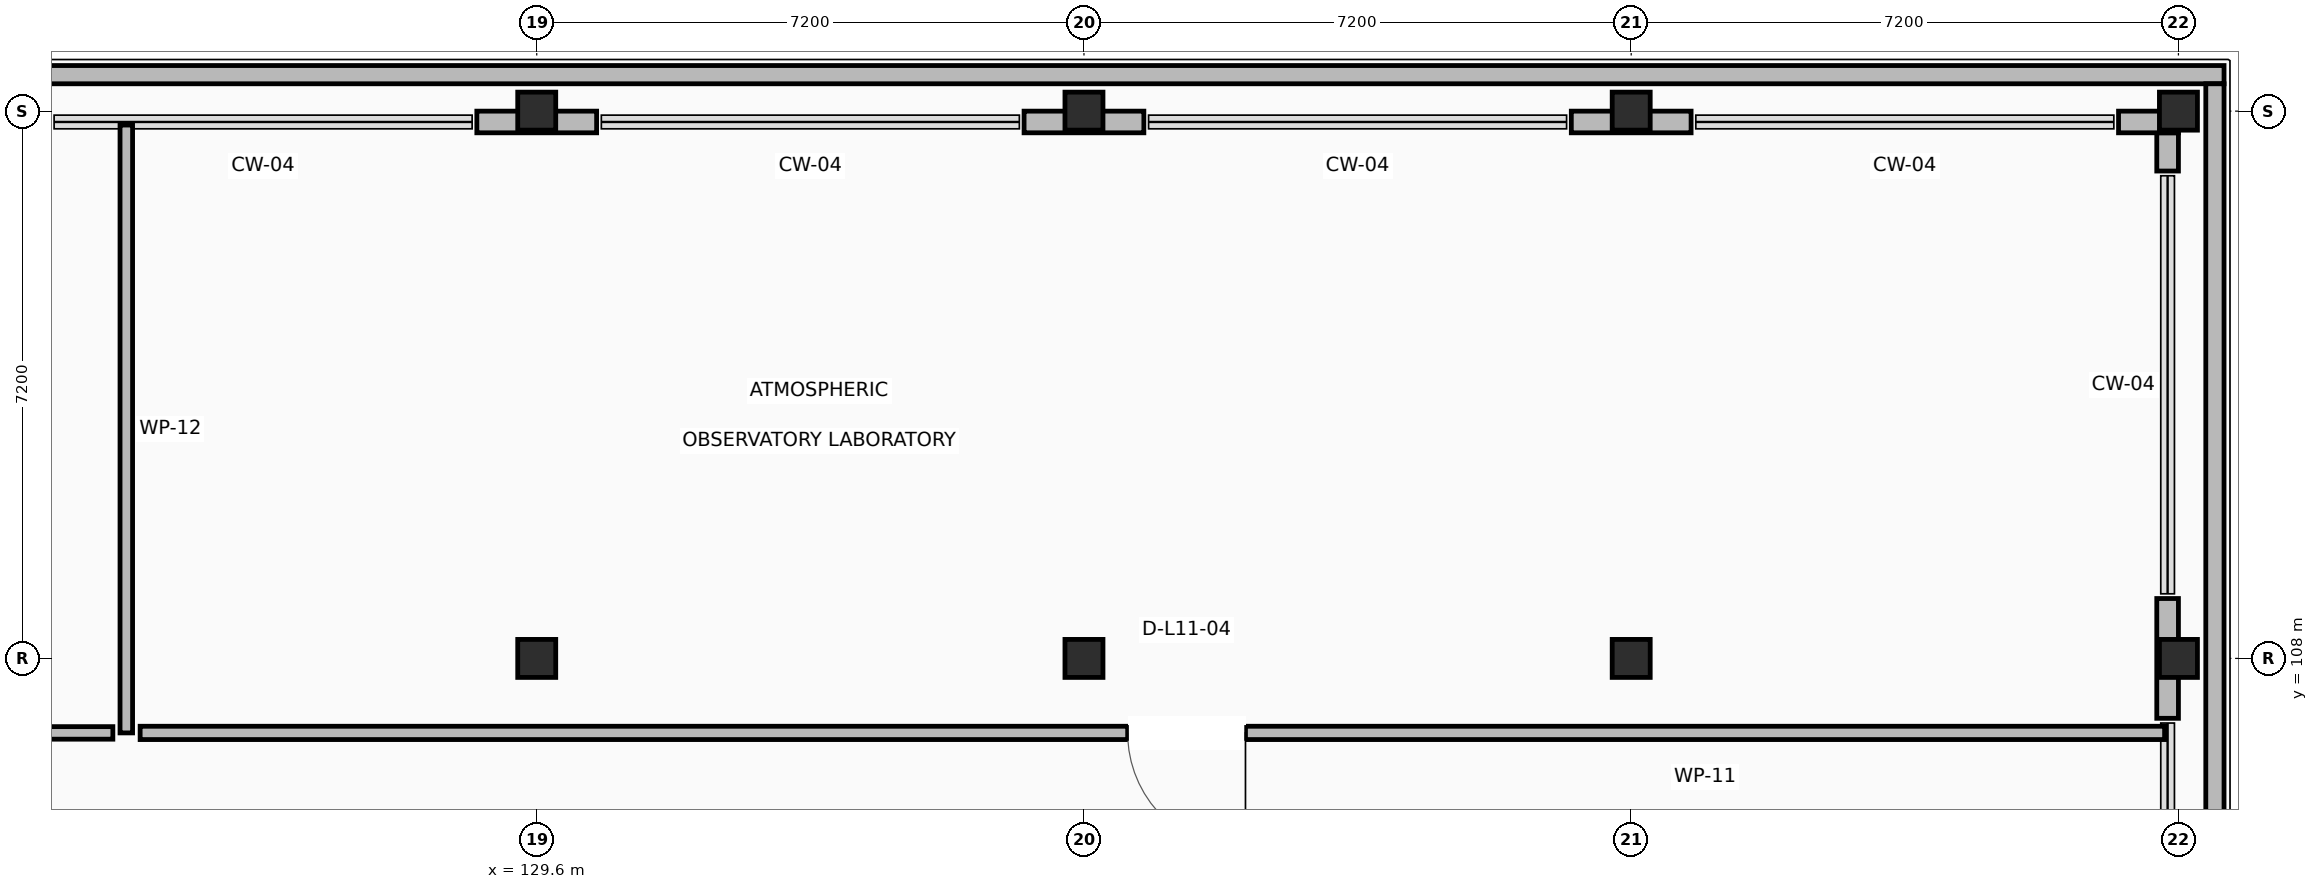
"""IFC4 building model, lengths in metres.
Left out: names, types, materials, properties, quantities, classifications, styles, units other than length and angle.
Written with IfcOpenShell. Run it as: python <this file> out.ifc"""

import sys

from ifc_helpers import new_model, si_unit, direction, frame, frame_2d, origin, origin_2d, place, context, subcontext, project, spatial, rectangle, extrude, element, fill, save


model = new_model("IFC4")
c1 = context("Model", 3, precision=1e-05, world=origin(), true_north=direction((0.0, 1.0)))
c2 = subcontext(c1, "Body", "Model", "MODEL_VIEW")
j1 = project(units=[si_unit("LENGTHUNIT", "METRE"), si_unit("PLANEANGLEUNIT", "RADIAN")], contexts=[c1])
p1 = place(None, origin())
s1 = spatial("IfcSite", under=j1, at=p1, CompositionType="ELEMENT")
p2 = place(p1, origin())
s2 = spatial("IfcBuilding", under=s1, at=p2, CompositionType="ELEMENT")
p3 = place(p2, frame((0.0, 0.0, 48.0)))
s3 = spatial("IfcBuildingStorey", under=s2, at=p3, CompositionType="ELEMENT", Elevation=48.0)
for number, where, z_axis, x_axis in (
    (1, (129.6, 108.0, 0.0), (0.0, 0.0, 1.0), (1.0, 0.0, 0.0)),
    (2, (129.6, 115.2, 0.0), (0.0, 0.0, 1.0), (1.0, 0.0, 0.0)),
    (3, (136.8, 108.0, 0.0), (0.0, 0.0, 1.0), (1.0, 0.0, 0.0)),
    (4, (136.8, 115.2, 0.0), (0.0, 0.0, 1.0), (1.0, 0.0, 0.0)),
    (5, (144.0, 108.0, 0.0), (0.0, 0.0, 1.0), (1.0, 0.0, 0.0)),
    (6, (144.0, 115.2, 0.0), (0.0, 0.0, 1.0), (1.0, 0.0, 0.0)),
):
    element("IfcColumn", number, at=place(p3, frame(where, z_axis=z_axis, x_axis=x_axis)), inside=s3, PredefinedType="COLUMN", context=c2, shape_type="SweptSolid", body=[
        extrude(rectangle(XDim=0.5, YDim=0.5, at=origin_2d()), origin(), (0.0, 0.0, 1.0), 3.92),
    ])
for number, where, z_axis, x_axis in (
    (7, (151.2, 108.0, 0.0), (0.0, 0.0, 1.0), (1.0, 0.0, 0.0)),
    (8, (151.2, 115.2, 0.0), (0.0, 0.0, 1.0), (1.0, 0.0, 0.0)),
):
    element("IfcColumn", number, at=place(p3, frame(where, z_axis=z_axis, x_axis=x_axis)), inside=s3, PredefinedType="COLUMN", context=c2, shape_type="SweptSolid", body=[
        extrude(rectangle(XDim=0.5, YDim=0.5, at=origin_2d()), origin(), (0.0, 0.0, 1.0), 4.2),
    ])
p4 = place(p3, frame((151.058, 107.212, 0.0), z_axis=(0.0, 0.0, 1.0), x_axis=(0.0, 1.0, 0.0)))
e9 = element("IfcWall", 9, at=p4, inside=s3, PredefinedType="STANDARD", context=c2, shape_type="SweptSolid", body=[
    extrude(rectangle(XDim=1.576, YDim=0.285, at=frame_2d((0.788, 0.0))), origin(), (0.0, 0.0, 1.0), 2.96),
])
p5 = place(p3, frame((151.058, 114.412, 0.0), z_axis=(0.0, 0.0, 1.0), x_axis=(0.0, 1.0, 0.0)))
e10 = element("IfcWall", 10, at=p5, inside=s3, PredefinedType="STANDARD", context=c2, shape_type="SweptSolid", body=[
    extrude(rectangle(XDim=0.503, YDim=0.285, at=frame_2d((0.251, 0.0))), origin(), (0.0, 0.0, 1.0), 2.96),
])
p6 = place(p3, frame((151.2, 115.058, 0.0), z_axis=(0.0, 0.0, 1.0), x_axis=(-1.0, 0.0, 0.0)))
e11 = element("IfcWall", 11, at=p6, inside=s3, PredefinedType="STANDARD", context=c2, shape_type="SweptSolid", body=[
    extrude(rectangle(XDim=0.788, YDim=0.285, at=frame_2d((0.394, 0.0))), origin(), (0.0, 0.0, 1.0), 2.96),
])
p7 = place(p3, frame((144.788, 115.058, 0.0), z_axis=(0.0, 0.0, 1.0), x_axis=(-1.0, 0.0, 0.0)))
e12 = element("IfcWall", 12, at=p7, inside=s3, PredefinedType="STANDARD", context=c2, shape_type="SweptSolid", body=[
    extrude(rectangle(XDim=1.576, YDim=0.285, at=frame_2d((0.788, 0.0))), origin(), (0.0, 0.0, 1.0), 2.96),
])
for number, where, z_axis, x_axis in (
    (13, (137.588, 115.058, 0.0), (0.0, 0.0, 1.0), (-1.0, 0.0, 0.0)),
    (14, (130.388, 115.058, 0.0), (0.0, 0.0, 1.0), (-1.0, 0.0, 0.0)),
):
    element("IfcWall", number, at=place(p3, frame(where, z_axis=z_axis, x_axis=x_axis)), inside=s3, PredefinedType="STANDARD", context=c2, shape_type="SweptSolid", body=[
        extrude(rectangle(XDim=1.576, YDim=0.285, at=frame_2d((0.788, 0.0))), origin(), (0.0, 0.0, 1.0), 2.96),
    ])
p8 = place(p3, frame((101.36, 115.68, 0.0), z_axis=(0.0, 0.0, 1.0), x_axis=(1.0, 0.0, 0.0)))
e15 = element("IfcWall", 15, at=p8, inside=s3, PredefinedType="PARAPET", context=c2, shape_type="SweptSolid", body=[
    extrude(rectangle(XDim=50.44, YDim=0.24, at=frame_2d((25.22, 0.0))), origin(), (0.0, 0.0, 1.0), 1.12),
])
p9 = place(p3, frame((151.68, 115.56, 0.0), z_axis=(0.0, 0.0, 1.0), x_axis=(0.0, -1.0, 0.0)))
e16 = element("IfcWall", 16, at=p9, inside=s3, PredefinedType="PARAPET", context=c2, shape_type="SweptSolid", body=[
    extrude(rectangle(XDim=22.32, YDim=0.24, at=frame_2d((11.16, 0.0))), origin(), (0.0, 0.0, 1.0), 1.12),
])
p10 = place(p3, frame((124.2, 115.017, 0.0), z_axis=(0.0, 0.0, 1.0), x_axis=(0.0, -1.0, 0.0)))
e17 = element("IfcWall", 17, at=p10, inside=s3, PredefinedType="PARTITIONING", context=c2, shape_type="SweptSolid", body=[
    extrude(rectangle(XDim=7.997, YDim=0.165, at=frame_2d((3.999, 0.0))), origin(), (0.0, 0.0, 1.0), 2.96),
])
p11 = place(p3, frame((124.023, 107.02, 0.0), z_axis=(0.0, 0.0, 1.0), x_axis=(-1.0, 0.0, 0.0)))
e18 = element("IfcWall", 18, at=p11, inside=s3, PredefinedType="PARTITIONING", context=c2, shape_type="SweptSolid", body=[
    extrude(rectangle(XDim=23.04, YDim=0.165, at=frame_2d((11.52, 0.0))), origin(), (0.0, 0.0, 1.0), 2.96),
])
p12 = place(p11, frame((10.96, 0.0, 0.0)))
e19 = element("IfcOpeningElement", 19, at=p12, cuts=e18, PredefinedType="OPENING", context=c2, shape_type="SweptSolid", body=[
    extrude(rectangle(XDim=1.12, YDim=2.15, at=frame_2d((0.56, 1.075))), frame((0.0, 0.093, 0.0), z_axis=(0.0, -1.0, 0.0), x_axis=(1.0, 0.0, 0.0)), (0.0, 0.0, 1.0), 0.185),
])
p13 = place(p3, frame((151.018, 107.02, 0.0), z_axis=(0.0, 0.0, 1.0), x_axis=(-1.0, 0.0, 0.0)))
e20 = element("IfcWall", 20, at=p13, inside=s3, PredefinedType="PARTITIONING", context=c2, shape_type="SweptSolid", body=[
    extrude(rectangle(XDim=26.636, YDim=0.175, at=frame_2d((13.318, 0.0))), origin(), (0.0, 0.0, 1.0), 2.96),
])
p14 = place(p13, frame((12.093, 0.0, 0.0)))
e21 = element("IfcOpeningElement", 21, at=p14, cuts=e20, PredefinedType="OPENING", context=c2, shape_type="SweptSolid", body=[
    extrude(rectangle(XDim=1.55, YDim=2.2, at=frame_2d((0.775, 1.1))), frame((0.0, 0.097, 0.0), z_axis=(0.0, -1.0, 0.0), x_axis=(1.0, 0.0, 0.0)), (0.0, 0.0, 1.0), 0.195),
])
p15 = place(p14, origin())
e22 = element("IfcDoor", 22, at=p15, inside=s3, OperationType="SINGLE_SWING_LEFT", PredefinedType="DOOR", context=c2, shape_type="SweptSolid", body=[
    extrude(rectangle(XDim=1.55, YDim=2.2, at=frame_2d((0.775, 1.1))), frame((0.0, 0.025, 0.0), z_axis=(0.0, -1.0, 0.0), x_axis=(1.0, 0.0, 0.0)), (0.0, 0.0, 1.0), 0.05),
])
fill(e21, e22)
save(model, sys.argv[1])
